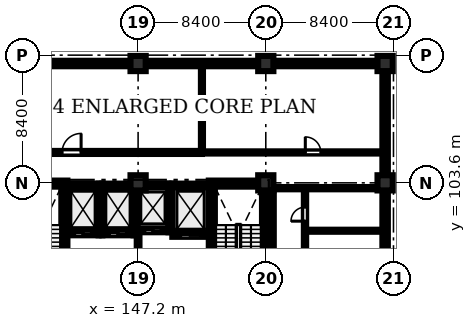
"""IFC4 building model, lengths in metres.
Left out: names, types, materials, properties, quantities, classifications, styles, units other than length and angle.
Written with IfcOpenShell. Run it as: python <this file> out.ifc"""

import sys

from ifc_helpers import new_model, si_unit, direction, frame, frame_2d, origin, origin_2d, place, context, subcontext, project, spatial, rectangle, extrude, element, fill, save


model = new_model("IFC4")
c1 = context("Model", 3, precision=1e-05, world=origin(), true_north=direction((0.0, 1.0)))
c2 = subcontext(c1, "Body", "Model", "MODEL_VIEW")
j1 = project(units=[si_unit("LENGTHUNIT", "METRE"), si_unit("PLANEANGLEUNIT", "RADIAN")], contexts=[c1])
p1 = place(None, origin())
s1 = spatial("IfcSite", under=j1, at=p1, CompositionType="ELEMENT")
p2 = place(p1, origin())
s2 = spatial("IfcBuilding", under=s1, at=p2, CompositionType="ELEMENT")
p3 = place(p2, frame((0.0, 0.0, 5.4)))
s3 = spatial("IfcBuildingStorey", under=s2, at=p3, CompositionType="ELEMENT", Elevation=5.4)
for number, where, z_axis, x_axis in (
    (1, (147.2, 103.6, 0.0), (0.0, 0.0, 1.0), (1.0, 0.0, 0.0)),
    (2, (147.2, 111.45, 0.0), (0.0, 0.0, 1.0), (1.0, 0.0, 0.0)),
    (3, (155.6, 103.6, 0.0), (0.0, 0.0, 1.0), (1.0, 0.0, 0.0)),
    (4, (155.6, 111.45, 0.0), (0.0, 0.0, 1.0), (1.0, 0.0, 0.0)),
    (5, (163.45, 103.6, 0.0), (0.0, 0.0, 1.0), (1.0, 0.0, 0.0)),
    (6, (163.45, 111.45, 0.0), (0.0, 0.0, 1.0), (1.0, 0.0, 0.0)),
):
    element("IfcColumn", number, at=place(p3, frame(where, z_axis=z_axis, x_axis=x_axis)), inside=s3, PredefinedType="COLUMN", context=c2, shape_type="SweptSolid", body=[
        extrude(rectangle(XDim=1.0, YDim=1.0, at=origin_2d()), origin(), (0.0, 0.0, 1.0), 4.58),
    ])
p4 = place(p3, frame((138.65, 103.55, 0.0), z_axis=(0.0, 0.0, 1.0), x_axis=(1.0, 0.0, 0.0)))
e7 = element("IfcWall", 7, at=p4, inside=s3, PredefinedType="SHEAR", context=c2, shape_type="SweptSolid", body=[
    extrude(rectangle(XDim=3.9, YDim=0.4, at=frame_2d((1.95, 0.0))), origin(), (0.0, 0.0, 1.0), 4.58),
])
p5 = place(p3, frame((142.35, 95.45, 0.0), z_axis=(0.0, 0.0, 1.0), x_axis=(0.0, 1.0, 0.0)))
e8 = element("IfcWall", 8, at=p5, inside=s3, PredefinedType="SHEAR", context=c2, shape_type="SweptSolid", body=[
    extrude(rectangle(XDim=7.9, YDim=0.4, at=frame_2d((3.95, 0.0))), origin(), (0.0, 0.0, 1.0), 4.58),
])
p6 = place(p5, frame((0.22, 0.0, 0.0)))
e9 = element("IfcOpeningElement", 9, at=p6, cuts=e8, PredefinedType="OPENING", context=c2, shape_type="SweptSolid", body=[
    extrude(rectangle(XDim=1.15, YDim=2.15, at=frame_2d((0.575, 1.075))), frame((0.0, 0.21, 0.0), z_axis=(0.0, -1.0, 0.0), x_axis=(1.0, 0.0, 0.0)), (0.0, 0.0, 1.0), 0.42),
])
p7 = place(p3, frame((151.85, 103.55, 0.0), z_axis=(0.0, 0.0, 1.0), x_axis=(1.0, 0.0, 0.0)))
e10 = element("IfcWall", 10, at=p7, inside=s3, PredefinedType="SHEAR", context=c2, shape_type="SweptSolid", body=[
    extrude(rectangle(XDim=3.9, YDim=0.4, at=frame_2d((1.95, 0.0))), origin(), (0.0, 0.0, 1.0), 4.58),
])
p8 = place(p3, frame((152.05, 95.45, 0.0), z_axis=(0.0, 0.0, 1.0), x_axis=(0.0, 1.0, 0.0)))
e11 = element("IfcWall", 11, at=p8, inside=s3, PredefinedType="SHEAR", context=c2, shape_type="SweptSolid", body=[
    extrude(rectangle(XDim=7.9, YDim=0.4, at=frame_2d((3.95, 0.0))), origin(), (0.0, 0.0, 1.0), 4.58),
])
p9 = place(p8, frame((0.35, 0.0, 0.0)))
e12 = element("IfcOpeningElement", 12, at=p9, cuts=e11, PredefinedType="OPENING", context=c2, shape_type="SweptSolid", body=[
    extrude(rectangle(XDim=1.15, YDim=2.15, at=frame_2d((0.575, 1.075))), frame((0.0, 0.21, 0.0), z_axis=(0.0, -1.0, 0.0), x_axis=(1.0, 0.0, 0.0)), (0.0, 0.0, 1.0), 0.42),
])
p10 = place(p3, frame((155.55, 95.45, 0.0), z_axis=(0.0, 0.0, 1.0), x_axis=(0.0, 1.0, 0.0)))
e13 = element("IfcWall", 13, at=p10, inside=s3, PredefinedType="SHEAR", context=c2, shape_type="SweptSolid", body=[
    extrude(rectangle(XDim=7.9, YDim=0.4, at=frame_2d((3.95, 0.0))), origin(), (0.0, 0.0, 1.0), 4.58),
])
p11 = place(p3, frame((142.55, 100.275, 0.0), z_axis=(0.0, 0.0, 1.0), x_axis=(1.0, 0.0, 0.0)))
e14 = element("IfcWall", 14, at=p11, inside=s3, PredefinedType="SHEAR", context=c2, shape_type="SweptSolid", body=[
    extrude(rectangle(XDim=2.05, YDim=0.25, at=frame_2d((1.025, 0.0))), origin(), (0.0, 0.0, 1.0), 4.58),
])
p12 = place(p11, frame((0.475, 0.0, 0.0)))
e15 = element("IfcOpeningElement", 15, at=p12, cuts=e14, PredefinedType="OPENING", context=c2, shape_type="SweptSolid", body=[
    extrude(rectangle(XDim=1.1, YDim=2.15, at=frame_2d((0.55, 1.075))), frame((0.0, 0.135, 0.0), z_axis=(0.0, -1.0, 0.0), x_axis=(1.0, 0.0, 0.0)), (0.0, 0.0, 1.0), 0.27),
])
p13 = place(p3, frame((142.55, 103.425, 0.0), z_axis=(0.0, 0.0, 1.0), x_axis=(1.0, 0.0, 0.0)))
e16 = element("IfcWall", 16, at=p13, inside=s3, PredefinedType="SHEAR", context=c2, shape_type="SweptSolid", body=[
    extrude(rectangle(XDim=2.05, YDim=0.25, at=frame_2d((1.025, 0.0))), origin(), (0.0, 0.0, 1.0), 4.58),
])
p14 = place(p3, frame((144.725, 100.15, 0.0), z_axis=(0.0, 0.0, 1.0), x_axis=(0.0, 1.0, 0.0)))
e17 = element("IfcWall", 17, at=p14, inside=s3, PredefinedType="SHEAR", context=c2, shape_type="SweptSolid", body=[
    extrude(rectangle(XDim=3.4, YDim=0.25, at=frame_2d((1.7, 0.0))), origin(), (0.0, 0.0, 1.0), 4.58),
])
p15 = place(p3, frame((144.85, 100.275, 0.0), z_axis=(0.0, 0.0, 1.0), x_axis=(1.0, 0.0, 0.0)))
e18 = element("IfcWall", 18, at=p15, inside=s3, PredefinedType="SHEAR", context=c2, shape_type="SweptSolid", body=[
    extrude(rectangle(XDim=2.05, YDim=0.25, at=frame_2d((1.025, 0.0))), origin(), (0.0, 0.0, 1.0), 4.58),
])
p16 = place(p15, frame((0.465, 0.0, 0.0)))
e19 = element("IfcOpeningElement", 19, at=p16, cuts=e18, PredefinedType="OPENING", context=c2, shape_type="SweptSolid", body=[
    extrude(rectangle(XDim=1.12, YDim=2.15, at=frame_2d((0.56, 1.075))), frame((0.0, 0.135, 0.0), z_axis=(0.0, -1.0, 0.0), x_axis=(1.0, 0.0, 0.0)), (0.0, 0.0, 1.0), 0.27),
])
p17 = place(p3, frame((144.85, 103.425, 0.0), z_axis=(0.0, 0.0, 1.0), x_axis=(1.0, 0.0, 0.0)))
e20 = element("IfcWall", 20, at=p17, inside=s3, PredefinedType="SHEAR", context=c2, shape_type="SweptSolid", body=[
    extrude(rectangle(XDim=2.05, YDim=0.25, at=frame_2d((1.025, 0.0))), origin(), (0.0, 0.0, 1.0), 4.58),
])
p18 = place(p3, frame((147.025, 100.15, 0.0), z_axis=(0.0, 0.0, 1.0), x_axis=(0.0, 1.0, 0.0)))
e21 = element("IfcWall", 21, at=p18, inside=s3, PredefinedType="SHEAR", context=c2, shape_type="SweptSolid", body=[
    extrude(rectangle(XDim=3.4, YDim=0.25, at=frame_2d((1.7, 0.0))), origin(), (0.0, 0.0, 1.0), 4.58),
])
p19 = place(p3, frame((147.15, 100.475, 0.0), z_axis=(0.0, 0.0, 1.0), x_axis=(1.0, 0.0, 0.0)))
e22 = element("IfcWall", 22, at=p19, inside=s3, PredefinedType="SHEAR", context=c2, shape_type="SweptSolid", body=[
    extrude(rectangle(XDim=2.05, YDim=0.25, at=frame_2d((1.025, 0.0))), origin(), (0.0, 0.0, 1.0), 4.58),
])
p20 = place(p19, frame((0.495, 0.0, 0.0)))
e23 = element("IfcOpeningElement", 23, at=p20, cuts=e22, PredefinedType="OPENING", context=c2, shape_type="SweptSolid", body=[
    extrude(rectangle(XDim=1.06, YDim=2.15, at=frame_2d((0.53, 1.075))), frame((0.0, 0.135, 0.0), z_axis=(0.0, -1.0, 0.0), x_axis=(1.0, 0.0, 0.0)), (0.0, 0.0, 1.0), 0.27),
])
p21 = place(p3, frame((147.15, 103.425, 0.0), z_axis=(0.0, 0.0, 1.0), x_axis=(1.0, 0.0, 0.0)))
e24 = element("IfcWall", 24, at=p21, inside=s3, PredefinedType="SHEAR", context=c2, shape_type="SweptSolid", body=[
    extrude(rectangle(XDim=2.05, YDim=0.25, at=frame_2d((1.025, 0.0))), origin(), (0.0, 0.0, 1.0), 4.58),
])
p22 = place(p3, frame((149.325, 100.35, 0.0), z_axis=(0.0, 0.0, 1.0), x_axis=(0.0, 1.0, 0.0)))
e25 = element("IfcWall", 25, at=p22, inside=s3, PredefinedType="SHEAR", context=c2, shape_type="SweptSolid", body=[
    extrude(rectangle(XDim=3.2, YDim=0.25, at=frame_2d((1.6, 0.0))), origin(), (0.0, 0.0, 1.0), 4.58),
])
p23 = place(p3, frame((149.45, 100.175, 0.0), z_axis=(0.0, 0.0, 1.0), x_axis=(1.0, 0.0, 0.0)))
e26 = element("IfcWall", 26, at=p23, inside=s3, PredefinedType="SHEAR", context=c2, shape_type="SweptSolid", body=[
    extrude(rectangle(XDim=2.4, YDim=0.25, at=frame_2d((1.2, 0.0))), origin(), (0.0, 0.0, 1.0), 4.58),
])
p24 = place(p23, frame((0.55, 0.0, 0.0)))
e27 = element("IfcOpeningElement", 27, at=p24, cuts=e26, PredefinedType="OPENING", context=c2, shape_type="SweptSolid", body=[
    extrude(rectangle(XDim=1.3, YDim=2.25, at=frame_2d((0.65, 1.125))), frame((0.0, 0.135, 0.0), z_axis=(0.0, -1.0, 0.0), x_axis=(1.0, 0.0, 0.0)), (0.0, 0.0, 1.0), 0.27),
])
p25 = place(p3, frame((149.45, 103.425, 0.0), z_axis=(0.0, 0.0, 1.0), x_axis=(1.0, 0.0, 0.0)))
e28 = element("IfcWall", 28, at=p25, inside=s3, PredefinedType="SHEAR", context=c2, shape_type="SweptSolid", body=[
    extrude(rectangle(XDim=2.4, YDim=0.25, at=frame_2d((1.2, 0.0))), origin(), (0.0, 0.0, 1.0), 4.58),
])
p26 = place(p3, frame((139.3, 111.45, 0.0), z_axis=(0.0, 0.0, 1.0), x_axis=(1.0, 0.0, 0.0)))
e29 = element("IfcWall", 29, at=p26, inside=s3, PredefinedType="STANDARD", context=c2, shape_type="SweptSolid", body=[
    extrude(rectangle(XDim=7.4, YDim=0.36, at=frame_2d((3.7, 0.0))), origin(), (0.0, 0.0, 1.0), 3.83),
])
p27 = place(p26, frame((1.3, 0.0, 1.1)))
e30 = element("IfcOpeningElement", 30, at=p27, cuts=e29, PredefinedType="OPENING", context=c2, shape_type="SweptSolid", body=[
    extrude(rectangle(XDim=1.2, YDim=1.5, at=frame_2d((0.6, 0.75))), frame((0.0, 0.19, 0.0), z_axis=(0.0, -1.0, 0.0), x_axis=(1.0, 0.0, 0.0)), (0.0, 0.0, 1.0), 0.38),
])
p28 = place(p26, frame((5.1, 0.0, 1.1)))
e31 = element("IfcOpeningElement", 31, at=p28, cuts=e29, PredefinedType="OPENING", context=c2, shape_type="SweptSolid", body=[
    extrude(rectangle(XDim=1.2, YDim=1.5, at=frame_2d((0.6, 0.75))), frame((0.0, 0.19, 0.0), z_axis=(0.0, -1.0, 0.0), x_axis=(1.0, 0.0, 0.0)), (0.0, 0.0, 1.0), 0.38),
])
p29 = place(p3, frame((147.7, 111.45, 0.0), z_axis=(0.0, 0.0, 1.0), x_axis=(1.0, 0.0, 0.0)))
e32 = element("IfcWall", 32, at=p29, inside=s3, PredefinedType="STANDARD", context=c2, shape_type="SweptSolid", body=[
    extrude(rectangle(XDim=7.4, YDim=0.36, at=frame_2d((3.7, 0.0))), origin(), (0.0, 0.0, 1.0), 3.83),
])
p30 = place(p29, frame((1.3, 0.0, 1.1)))
e33 = element("IfcOpeningElement", 33, at=p30, cuts=e32, PredefinedType="OPENING", context=c2, shape_type="SweptSolid", body=[
    extrude(rectangle(XDim=1.2, YDim=1.5, at=frame_2d((0.6, 0.75))), frame((0.0, 0.19, 0.0), z_axis=(0.0, -1.0, 0.0), x_axis=(1.0, 0.0, 0.0)), (0.0, 0.0, 1.0), 0.38),
])
p31 = place(p29, frame((5.1, 0.0, 1.1)))
e34 = element("IfcOpeningElement", 34, at=p31, cuts=e32, PredefinedType="OPENING", context=c2, shape_type="SweptSolid", body=[
    extrude(rectangle(XDim=1.2, YDim=1.5, at=frame_2d((0.6, 0.75))), frame((0.0, 0.19, 0.0), z_axis=(0.0, -1.0, 0.0), x_axis=(1.0, 0.0, 0.0)), (0.0, 0.0, 1.0), 0.38),
])
p32 = place(p3, frame((156.1, 111.45, 0.0), z_axis=(0.0, 0.0, 1.0), x_axis=(1.0, 0.0, 0.0)))
e35 = element("IfcWall", 35, at=p32, inside=s3, PredefinedType="STANDARD", context=c2, shape_type="SweptSolid", body=[
    extrude(rectangle(XDim=6.85, YDim=0.36, at=frame_2d((3.425, 0.0))), origin(), (0.0, 0.0, 1.0), 3.83),
])
p33 = place(p32, frame((1.3, 0.0, 1.1)))
e36 = element("IfcOpeningElement", 36, at=p33, cuts=e35, PredefinedType="OPENING", context=c2, shape_type="SweptSolid", body=[
    extrude(rectangle(XDim=1.2, YDim=1.5, at=frame_2d((0.6, 0.75))), frame((0.0, 0.19, 0.0), z_axis=(0.0, -1.0, 0.0), x_axis=(1.0, 0.0, 0.0)), (0.0, 0.0, 1.0), 0.38),
])
p34 = place(p32, frame((5.1, 0.0, 1.1)))
e37 = element("IfcOpeningElement", 37, at=p34, cuts=e35, PredefinedType="OPENING", context=c2, shape_type="SweptSolid", body=[
    extrude(rectangle(XDim=1.2, YDim=1.5, at=frame_2d((0.6, 0.75))), frame((0.0, 0.19, 0.0), z_axis=(0.0, -1.0, 0.0), x_axis=(1.0, 0.0, 0.0)), (0.0, 0.0, 1.0), 0.38),
])
p35 = place(p3, frame((163.45, 103.1, 0.0), z_axis=(0.0, 0.0, 1.0), x_axis=(0.0, -1.0, 0.0)))
e38 = element("IfcWall", 38, at=p35, inside=s3, PredefinedType="STANDARD", context=c2, shape_type="SweptSolid", body=[
    extrude(rectangle(XDim=7.4, YDim=0.36, at=frame_2d((3.7, 0.0))), origin(), (0.0, 0.0, 1.0), 3.83),
])
p36 = place(p35, frame((1.15, 0.0, 1.1)))
e39 = element("IfcOpeningElement", 39, at=p36, cuts=e38, PredefinedType="OPENING", context=c2, shape_type="SweptSolid", body=[
    extrude(rectangle(XDim=1.4, YDim=1.4, at=frame_2d((0.7, 0.7))), frame((0.0, 0.19, 0.0), z_axis=(0.0, -1.0, 0.0), x_axis=(1.0, 0.0, 0.0)), (0.0, 0.0, 1.0), 0.38),
])
p37 = place(p3, frame((163.45, 110.95, 0.0), z_axis=(0.0, 0.0, 1.0), x_axis=(0.0, -1.0, 0.0)))
e40 = element("IfcWall", 40, at=p37, inside=s3, PredefinedType="STANDARD", context=c2, shape_type="SweptSolid", body=[
    extrude(rectangle(XDim=6.85, YDim=0.36, at=frame_2d((3.425, 0.0))), origin(), (0.0, 0.0, 1.0), 3.83),
])
p38 = place(p37, frame((1.15, 0.0, 1.1)))
e41 = element("IfcOpeningElement", 41, at=p38, cuts=e40, PredefinedType="OPENING", context=c2, shape_type="SweptSolid", body=[
    extrude(rectangle(XDim=1.8, YDim=1.8, at=frame_2d((0.9, 0.9))), frame((0.0, 0.19, 0.0), z_axis=(0.0, -1.0, 0.0), x_axis=(1.0, 0.0, 0.0)), (0.0, 0.0, 1.0), 0.38),
])
p39 = place(p3, frame((147.2, 95.75, 0.0), z_axis=(0.0, 0.0, 1.0), x_axis=(0.0, 1.0, 0.0)))
e42 = element("IfcWall", 42, at=p39, inside=s3, PredefinedType="STANDARD", context=c2, shape_type="SweptSolid", body=[
    extrude(rectangle(XDim=4.5, YDim=0.18, at=frame_2d((2.25, 0.0))), origin(), (0.0, 0.0, 1.0), 3.83),
])
p40 = place(p3, frame((158.18, 94.68, 0.0), z_axis=(0.0, 0.0, 1.0), x_axis=(0.0, 1.0, 0.0)))
e43 = element("IfcWall", 43, at=p40, inside=s3, PredefinedType="PARTITIONING", context=c2, shape_type="SweptSolid", body=[
    extrude(rectangle(XDim=8.57, YDim=0.15, at=frame_2d((4.285, 0.0))), origin(), (0.0, 0.0, 1.0), 4.58),
])
p41 = place(p40, frame((0.8, 0.0, 0.0)))
e44 = element("IfcOpeningElement", 44, at=p41, cuts=e43, PredefinedType="OPENING", context=c2, shape_type="SweptSolid", body=[
    extrude(rectangle(XDim=1.0, YDim=2.12, at=frame_2d((0.5, 1.06))), frame((0.0, 0.085, 0.0), z_axis=(0.0, -1.0, 0.0), x_axis=(1.0, 0.0, 0.0)), (0.0, 0.0, 1.0), 0.17),
])
p42 = place(p40, frame((3.5, 0.0, 0.0)))
e45 = element("IfcOpeningElement", 45, at=p42, cuts=e43, PredefinedType="OPENING", context=c2, shape_type="SweptSolid", body=[
    extrude(rectangle(XDim=0.92, YDim=2.1, at=frame_2d((0.46, 1.05))), frame((0.0, 0.085, 0.0), z_axis=(0.0, -1.0, 0.0), x_axis=(1.0, 0.0, 0.0)), (0.0, 0.0, 1.0), 0.17),
])
p43 = place(p40, frame((6.4, 0.0, 0.0)))
e46 = element("IfcOpeningElement", 46, at=p43, cuts=e43, PredefinedType="OPENING", context=c2, shape_type="SweptSolid", body=[
    extrude(rectangle(XDim=0.92, YDim=2.1, at=frame_2d((0.46, 1.05))), frame((0.0, 0.085, 0.0), z_axis=(0.0, -1.0, 0.0), x_axis=(1.0, 0.0, 0.0)), (0.0, 0.0, 1.0), 0.17),
])
p44 = place(p3, frame((158.18, 100.45, 0.0), z_axis=(0.0, 0.0, 1.0), x_axis=(1.0, 0.0, 0.0)))
e47 = element("IfcWall", 47, at=p44, inside=s3, PredefinedType="PARTITIONING", context=c2, shape_type="SweptSolid", body=[
    extrude(rectangle(XDim=5.02, YDim=0.135, at=frame_2d((2.51, 0.0))), origin(), (0.0, 0.0, 1.0), 4.58),
])
p45 = place(p3, frame((156.05, 103.25, 0.0), z_axis=(0.0, 0.0, 1.0), x_axis=(1.0, 0.0, 0.0)))
e48 = element("IfcWall", 48, at=p45, inside=s3, PredefinedType="PARTITIONING", context=c2, shape_type="SweptSolid", body=[
    extrude(rectangle(XDim=7.15, YDim=0.15, at=frame_2d((3.575, 0.0))), origin(), (0.0, 0.0, 1.0), 4.58),
])
p46 = place(p3, frame((156.05, 94.68, 0.0), z_axis=(0.0, 0.0, 1.0), x_axis=(0.0, 1.0, 0.0)))
e49 = element("IfcWall", 49, at=p46, inside=s3, PredefinedType="PARTITIONING", context=c2, shape_type="SweptSolid", body=[
    extrude(rectangle(XDim=8.57, YDim=0.15, at=frame_2d((4.285, 0.0))), origin(), (0.0, 0.0, 1.0), 4.58),
])
p47 = place(p3, frame((138.8, 105.6, 0.0), z_axis=(0.0, 0.0, 1.0), x_axis=(1.0, 0.0, 0.0)))
e50 = element("IfcWall", 50, at=p47, inside=s3, PredefinedType="SOLIDWALL", context=c2, shape_type="SweptSolid", body=[
    extrude(rectangle(XDim=12.6, YDim=0.2, at=frame_2d((6.3, 0.0))), origin(), (0.0, 0.0, 1.0), 4.58),
])
p48 = place(p47, frame((3.4, 0.0, 0.0)))
e51 = element("IfcOpeningElement", 51, at=p48, cuts=e50, PredefinedType="OPENING", context=c2, shape_type="SweptSolid", body=[
    extrude(rectangle(XDim=1.25, YDim=2.2, at=frame_2d((0.625, 1.1))), frame((0.0, 0.11, 0.0), z_axis=(0.0, -1.0, 0.0), x_axis=(1.0, 0.0, 0.0)), (0.0, 0.0, 1.0), 0.22),
])
p49 = place(p3, frame((151.4, 105.6, 0.0), z_axis=(0.0, 0.0, 1.0), x_axis=(1.0, 0.0, 0.0)))
e52 = element("IfcWall", 52, at=p49, inside=s3, PredefinedType="PARTITIONING", context=c2, shape_type="SweptSolid", body=[
    extrude(rectangle(XDim=11.95, YDim=0.145, at=frame_2d((5.975, 0.0))), origin(), (0.0, 0.0, 1.0), 4.58),
])
p50 = place(p49, frame((6.8, 0.0, 0.0)))
e53 = element("IfcOpeningElement", 53, at=p50, cuts=e52, PredefinedType="OPENING", context=c2, shape_type="SweptSolid", body=[
    extrude(rectangle(XDim=1.02, YDim=2.15, at=frame_2d((0.51, 1.075))), frame((0.0, 0.083, 0.0), z_axis=(0.0, -1.0, 0.0), x_axis=(1.0, 0.0, 0.0)), (0.0, 0.0, 1.0), 0.165),
])
p51 = place(p3, frame((151.4, 105.6, 0.0), z_axis=(0.0, 0.0, 1.0), x_axis=(0.0, 1.0, 0.0)))
e54 = element("IfcWall", 54, at=p51, inside=s3, PredefinedType="PARTITIONING", context=c2, shape_type="SweptSolid", body=[
    extrude(rectangle(XDim=5.75, YDim=0.135, at=frame_2d((2.875, 0.0))), origin(), (0.0, 0.0, 1.0), 4.03),
])
p52 = place(p27, origin())
e55 = element("IfcWindow", 55, at=p52, inside=s3, PartitioningType="SINGLE_PANEL", PredefinedType="WINDOW", context=c2, shape_type="SweptSolid", body=[
    extrude(rectangle(XDim=1.2, YDim=1.5, at=frame_2d((0.6, 0.75))), frame((0.0, 0.03, 0.0), z_axis=(0.0, -1.0, 0.0), x_axis=(1.0, 0.0, 0.0)), (0.0, 0.0, 1.0), 0.06),
])
fill(e30, e55)
p53 = place(p28, origin())
e56 = element("IfcWindow", 56, at=p53, inside=s3, PartitioningType="SINGLE_PANEL", PredefinedType="WINDOW", context=c2, shape_type="SweptSolid", body=[
    extrude(rectangle(XDim=1.2, YDim=1.5, at=frame_2d((0.6, 0.75))), frame((0.0, 0.03, 0.0), z_axis=(0.0, -1.0, 0.0), x_axis=(1.0, 0.0, 0.0)), (0.0, 0.0, 1.0), 0.06),
])
fill(e31, e56)
p54 = place(p30, origin())
e57 = element("IfcWindow", 57, at=p54, inside=s3, PartitioningType="SINGLE_PANEL", PredefinedType="WINDOW", context=c2, shape_type="SweptSolid", body=[
    extrude(rectangle(XDim=1.2, YDim=1.5, at=frame_2d((0.6, 0.75))), frame((0.0, 0.03, 0.0), z_axis=(0.0, -1.0, 0.0), x_axis=(1.0, 0.0, 0.0)), (0.0, 0.0, 1.0), 0.06),
])
fill(e33, e57)
p55 = place(p31, origin())
e58 = element("IfcWindow", 58, at=p55, inside=s3, PartitioningType="SINGLE_PANEL", PredefinedType="WINDOW", context=c2, shape_type="SweptSolid", body=[
    extrude(rectangle(XDim=1.2, YDim=1.5, at=frame_2d((0.6, 0.75))), frame((0.0, 0.03, 0.0), z_axis=(0.0, -1.0, 0.0), x_axis=(1.0, 0.0, 0.0)), (0.0, 0.0, 1.0), 0.06),
])
fill(e34, e58)
p56 = place(p33, origin())
e59 = element("IfcWindow", 59, at=p56, inside=s3, PartitioningType="SINGLE_PANEL", PredefinedType="WINDOW", context=c2, shape_type="SweptSolid", body=[
    extrude(rectangle(XDim=1.2, YDim=1.5, at=frame_2d((0.6, 0.75))), frame((0.0, 0.03, 0.0), z_axis=(0.0, -1.0, 0.0), x_axis=(1.0, 0.0, 0.0)), (0.0, 0.0, 1.0), 0.06),
])
fill(e36, e59)
p57 = place(p34, origin())
e60 = element("IfcWindow", 60, at=p57, inside=s3, PartitioningType="SINGLE_PANEL", PredefinedType="WINDOW", context=c2, shape_type="SweptSolid", body=[
    extrude(rectangle(XDim=1.2, YDim=1.5, at=frame_2d((0.6, 0.75))), frame((0.0, 0.03, 0.0), z_axis=(0.0, -1.0, 0.0), x_axis=(1.0, 0.0, 0.0)), (0.0, 0.0, 1.0), 0.06),
])
fill(e37, e60)
p58 = place(p36, origin())
e61 = element("IfcWindow", 61, at=p58, inside=s3, PartitioningType="SINGLE_PANEL", PredefinedType="WINDOW", context=c2, shape_type="SweptSolid", body=[
    extrude(rectangle(XDim=1.4, YDim=1.4, at=frame_2d((0.7, 0.7))), frame((0.0, 0.03, 0.0), z_axis=(0.0, -1.0, 0.0), x_axis=(1.0, 0.0, 0.0)), (0.0, 0.0, 1.0), 0.06),
])
fill(e39, e61)
p59 = place(p38, origin())
e62 = element("IfcWindow", 62, at=p59, inside=s3, PartitioningType="DOUBLE_PANEL_VERTICAL", PredefinedType="WINDOW", context=c2, shape_type="SweptSolid", body=[
    extrude(rectangle(XDim=1.8, YDim=1.8, at=frame_2d((0.9, 0.9))), frame((0.0, 0.03, 0.0), z_axis=(0.0, -1.0, 0.0), x_axis=(1.0, 0.0, 0.0)), (0.0, 0.0, 1.0), 0.06),
])
fill(e41, e62)
p60 = place(p43, origin())
e63 = element("IfcDoor", 63, at=p60, inside=s3, OperationType="SINGLE_SWING_LEFT", PredefinedType="DOOR", context=c2, shape_type="SweptSolid", body=[
    extrude(rectangle(XDim=0.92, YDim=2.1, at=frame_2d((0.46, 1.05))), frame((0.0, 0.025, 0.0), z_axis=(0.0, -1.0, 0.0), x_axis=(1.0, 0.0, 0.0)), (0.0, 0.0, 1.0), 0.05),
])
fill(e46, e63)
p61 = place(p48, origin())
e64 = element("IfcDoor", 64, at=p61, inside=s3, OperationType="SINGLE_SWING_RIGHT", PredefinedType="DOOR", context=c2, shape_type="SweptSolid", body=[
    extrude(rectangle(XDim=1.25, YDim=2.2, at=frame_2d((0.625, 1.1))), frame((0.0, 0.025, 0.0), z_axis=(0.0, -1.0, 0.0), x_axis=(1.0, 0.0, 0.0)), (0.0, 0.0, 1.0), 0.05),
])
fill(e51, e64)
p62 = place(p50, origin())
e65 = element("IfcDoor", 65, at=p62, inside=s3, OperationType="SINGLE_SWING_LEFT", PredefinedType="DOOR", context=c2, shape_type="SweptSolid", body=[
    extrude(rectangle(XDim=1.02, YDim=2.15, at=frame_2d((0.51, 1.075))), frame((0.0, 0.025, 0.0), z_axis=(0.0, -1.0, 0.0), x_axis=(1.0, 0.0, 0.0)), (0.0, 0.0, 1.0), 0.05),
])
fill(e53, e65)
p63 = place(p12, origin())
e66 = element("IfcDoor", 66, at=p63, inside=s3, OperationType="SLIDING_TO_LEFT", PredefinedType="DOOR", context=c2, shape_type="SweptSolid", body=[
    extrude(rectangle(XDim=1.1, YDim=2.15, at=frame_2d((0.55, 1.075))), frame((0.0, 0.025, 0.0), z_axis=(0.0, -1.0, 0.0), x_axis=(1.0, 0.0, 0.0)), (0.0, 0.0, 1.0), 0.05),
])
fill(e15, e66)
p64 = place(p16, origin())
e67 = element("IfcDoor", 67, at=p64, inside=s3, OperationType="SLIDING_TO_LEFT", PredefinedType="DOOR", context=c2, shape_type="SweptSolid", body=[
    extrude(rectangle(XDim=1.12, YDim=2.15, at=frame_2d((0.56, 1.075))), frame((0.0, 0.025, 0.0), z_axis=(0.0, -1.0, 0.0), x_axis=(1.0, 0.0, 0.0)), (0.0, 0.0, 1.0), 0.05),
])
fill(e19, e67)
p65 = place(p20, origin())
e68 = element("IfcDoor", 68, at=p65, inside=s3, OperationType="SLIDING_TO_LEFT", PredefinedType="DOOR", context=c2, shape_type="SweptSolid", body=[
    extrude(rectangle(XDim=1.06, YDim=2.15, at=frame_2d((0.53, 1.075))), frame((0.0, 0.025, 0.0), z_axis=(0.0, -1.0, 0.0), x_axis=(1.0, 0.0, 0.0)), (0.0, 0.0, 1.0), 0.05),
])
fill(e23, e68)
p66 = place(p24, origin())
e69 = element("IfcDoor", 69, at=p66, inside=s3, OperationType="SLIDING_TO_LEFT", PredefinedType="DOOR", context=c2, shape_type="SweptSolid", body=[
    extrude(rectangle(XDim=1.3, YDim=2.25, at=frame_2d((0.65, 1.125))), frame((0.0, 0.025, 0.0), z_axis=(0.0, -1.0, 0.0), x_axis=(1.0, 0.0, 0.0)), (0.0, 0.0, 1.0), 0.05),
])
fill(e27, e69)
save(model, sys.argv[1])
